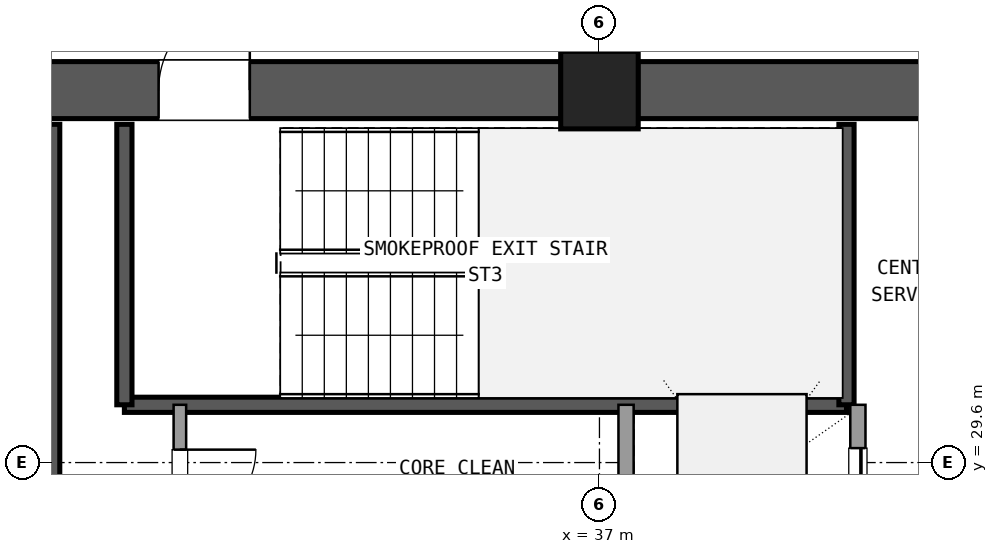
"""IFC4 building model, lengths in metres.
Left out: names, types, materials, properties, quantities, classifications, styles, units other than length and angle.
Written with IfcOpenShell. Run it as: python <this file> out.ifc"""

import sys

from ifc_helpers import new_model, si_unit, direction, frame, frame_2d, origin, origin_2d, place, context, subcontext, project, spatial, rectangle, extrude, element, fill, save


model = new_model("IFC4")
c1 = context("Model", 3, precision=1e-05, world=origin(), true_north=direction((0.0, 1.0)))
c2 = subcontext(c1, "Body", "Model", "MODEL_VIEW")
j1 = project(units=[si_unit("LENGTHUNIT", "METRE"), si_unit("PLANEANGLEUNIT", "RADIAN")], contexts=[c1])
p1 = place(None, origin())
s1 = spatial("IfcSite", under=j1, at=p1, CompositionType="ELEMENT")
p2 = place(p1, origin())
s2 = spatial("IfcBuilding", under=s1, at=p2, CompositionType="ELEMENT")
p3 = place(p2, frame((0.0, 0.0, 102.78)))
s3 = spatial("IfcBuildingStorey", under=s2, at=p3, CompositionType="ELEMENT", Elevation=102.78)
p4 = place(p3, frame((37.0, 34.5, 0.0), z_axis=(0.0, 0.0, 1.0), x_axis=(1.0, 0.0, 0.0)))
e1 = element("IfcColumn", 1, at=p4, inside=s3, PredefinedType="COLUMN", context=c2, shape_type="SweptSolid", body=[
    extrude(rectangle(XDim=1.02, YDim=1.02, at=origin_2d()), origin(), (0.0, 0.0, 1.0), 3.6),
])
p5 = place(p3, frame((47.695, 34.5, 0.0), z_axis=(0.0, 0.0, 1.0), x_axis=(-1.0, 0.0, 0.0)))
e2 = element("IfcWall", 2, at=p5, inside=s3, PredefinedType="SHEAR", context=c2, shape_type="SweptSolid", body=[
    extrude(rectangle(XDim=10.19, YDim=0.75, at=frame_2d((5.095, 0.0))), origin(), (0.0, 0.0, 1.0), 3.32),
])
p6 = place(p5, frame((4.595, 0.0, 0.0)))
e3 = element("IfcOpeningElement", 3, at=p6, cuts=e2, PredefinedType="OPENING", context=c2, shape_type="SweptSolid", body=[
    extrude(rectangle(XDim=1.6, YDim=2.2, at=frame_2d((0.8, 1.1))), frame((0.0, 0.385, 0.0), z_axis=(0.0, -1.0, 0.0), x_axis=(1.0, 0.0, 0.0)), (0.0, 0.0, 1.0), 0.77),
])
p7 = place(p3, frame((36.495, 34.5, 0.0), z_axis=(0.0, 0.0, 1.0), x_axis=(-1.0, 0.0, 0.0)))
e4 = element("IfcWall", 4, at=p7, inside=s3, PredefinedType="SHEAR", context=c2, shape_type="SweptSolid", body=[
    extrude(rectangle(XDim=10.19, YDim=0.75, at=frame_2d((5.095, 0.0))), origin(), (0.0, 0.0, 1.0), 3.32),
])
p8 = place(p7, frame((4.095, 0.0, 0.0)))
e5 = element("IfcOpeningElement", 5, at=p8, cuts=e4, PredefinedType="OPENING", context=c2, shape_type="SweptSolid", body=[
    extrude(rectangle(XDim=1.2, YDim=2.15, at=frame_2d((0.6, 1.075))), frame((0.0, 0.385, 0.0), z_axis=(0.0, -1.0, 0.0), x_axis=(1.0, 0.0, 0.0)), (0.0, 0.0, 1.0), 0.77),
])
p9 = place(p3, frame((29.8, 24.65, 0.0), z_axis=(0.0, 0.0, 1.0), x_axis=(0.0, 1.0, 0.0)))
e6 = element("IfcWall", 6, at=p9, inside=s3, PredefinedType="SHEAR", context=c2, shape_type="SweptSolid", body=[
    extrude(rectangle(XDim=9.4, YDim=0.2, at=frame_2d((4.7, 0.0))), origin(), (0.0, 0.0, 1.0), 3.32),
])
p10 = place(p3, frame((30.75, 30.36, 0.0), z_axis=(0.0, 0.0, 1.0), x_axis=(1.0, 0.0, 0.0)))
e7 = element("IfcWall", 7, at=p10, inside=s3, PredefinedType="SHEAR", context=c2, shape_type="SweptSolid", body=[
    extrude(rectangle(XDim=9.5, YDim=0.2, at=frame_2d((4.75, 0.0))), origin(), (0.0, 0.0, 1.0), 3.32),
])
for number, where, z_axis, x_axis in (
    (8, (30.75, 30.36, 0.0), (0.0, 0.0, 1.0), (0.0, 1.0, 0.0)),
    (9, (40.25, 30.36, 0.0), (0.0, 0.0, 1.0), (0.0, 1.0, 0.0)),
):
    element("IfcWall", number, at=place(p3, frame(where, z_axis=z_axis, x_axis=x_axis)), inside=s3, PredefinedType="SHEAR", context=c2, shape_type="SweptSolid", body=[
        extrude(rectangle(XDim=3.69, YDim=0.2, at=frame_2d((1.845, 0.0))), origin(), (0.0, 0.0, 1.0), 3.32),
    ])
p11 = place(p3, frame((37.35, 23.54, 0.0), z_axis=(0.0, 0.0, 1.0), x_axis=(0.0, 1.0, 0.0)))
e10 = element("IfcWall", 10, at=p11, inside=s3, PredefinedType="SOLIDWALL", context=c2, shape_type="SweptSolid", body=[
    extrude(rectangle(XDim=6.82, YDim=0.2, at=frame_2d((3.41, 0.0))), origin(), (0.0, 0.0, 1.0), 2.61),
])
p12 = place(p3, frame((40.4, 23.54, 0.0), z_axis=(0.0, 0.0, 1.0), x_axis=(0.0, 1.0, 0.0)))
e11 = element("IfcWall", 11, at=p12, inside=s3, PredefinedType="SOLIDWALL", context=c2, shape_type="SweptSolid", body=[
    extrude(rectangle(XDim=6.82, YDim=0.2, at=frame_2d((3.41, 0.0))), origin(), (0.0, 0.0, 1.0), 2.61),
])
p13 = place(p12, frame((0.35, 0.0, 0.0)))
e12 = element("IfcOpeningElement", 12, at=p13, cuts=e11, PredefinedType="OPENING", context=c2, shape_type="SweptSolid", body=[
    extrude(rectangle(XDim=1.4, YDim=2.2, at=frame_2d((0.7, 1.1))), frame((0.0, 0.11, 0.0), z_axis=(0.0, -1.0, 0.0), x_axis=(1.0, 0.0, 0.0)), (0.0, 0.0, 1.0), 0.22),
])
p14 = place(p12, frame((2.65, 0.0, 0.0)))
e13 = element("IfcOpeningElement", 13, at=p14, cuts=e11, PredefinedType="OPENING", context=c2, shape_type="SweptSolid", body=[
    extrude(rectangle(XDim=1.4, YDim=2.2, at=frame_2d((0.7, 1.1))), frame((0.0, 0.11, 0.0), z_axis=(0.0, -1.0, 0.0), x_axis=(1.0, 0.0, 0.0)), (0.0, 0.0, 1.0), 0.22),
])
p15 = place(p12, frame((4.85, 0.0, 0.0)))
e14 = element("IfcOpeningElement", 14, at=p15, cuts=e11, PredefinedType="OPENING", context=c2, shape_type="SweptSolid", body=[
    extrude(rectangle(XDim=1.4, YDim=2.2, at=frame_2d((0.7, 1.1))), frame((0.0, 0.11, 0.0), z_axis=(0.0, -1.0, 0.0), x_axis=(1.0, 0.0, 0.0)), (0.0, 0.0, 1.0), 0.22),
])
p16 = place(p3, frame((31.48, 26.32, 0.0), z_axis=(0.0, 0.0, 1.0), x_axis=(0.0, 1.0, 0.0)))
e15 = element("IfcWall", 15, at=p16, inside=s3, PredefinedType="PLUMBINGWALL", context=c2, shape_type="SweptSolid", body=[
    extrude(rectangle(XDim=4.04, YDim=0.165, at=frame_2d((2.02, 0.0))), origin(), (0.0, 0.0, 1.0), 2.61),
])
p17 = place(p16, frame((0.5, 0.0, 0.0)))
e16 = element("IfcOpeningElement", 16, at=p17, cuts=e15, PredefinedType="OPENING", context=c2, shape_type="SweptSolid", body=[
    extrude(rectangle(XDim=0.95, YDim=2.1, at=frame_2d((0.475, 1.05))), frame((0.0, 0.093, 0.0), z_axis=(0.0, -1.0, 0.0), x_axis=(1.0, 0.0, 0.0)), (0.0, 0.0, 1.0), 0.185),
])
p18 = place(p16, frame((2.45, 0.0, 0.0)))
e17 = element("IfcOpeningElement", 17, at=p18, cuts=e15, PredefinedType="OPENING", context=c2, shape_type="SweptSolid", body=[
    extrude(rectangle(XDim=1.0, YDim=2.15, at=frame_2d((0.5, 1.075))), frame((0.0, 0.093, 0.0), z_axis=(0.0, -1.0, 0.0), x_axis=(1.0, 0.0, 0.0)), (0.0, 0.0, 1.0), 0.185),
])
p19 = place(p3, frame((37.0, 34.95, 0.0), z_axis=(0.0, 0.0, 1.0), x_axis=(0.0, 1.0, 0.0)))
e18 = element("IfcWall", 18, at=p19, inside=s3, PredefinedType="PARTITIONING", context=c2, shape_type="SweptSolid", body=[
    extrude(rectangle(XDim=3.21, YDim=0.18, at=frame_2d((1.605, 0.0))), origin(), (0.0, 0.0, 1.0), 2.61),
])
p20 = place(p19, frame((0.605, 0.0, 0.0)))
e19 = element("IfcOpeningElement", 19, at=p20, cuts=e18, PredefinedType="OPENING", context=c2, shape_type="SweptSolid", body=[
    extrude(rectangle(XDim=2.0, YDim=2.2, at=frame_2d((1.0, 1.1))), frame((0.0, 0.1, 0.0), z_axis=(0.0, -1.0, 0.0), x_axis=(1.0, 0.0, 0.0)), (0.0, 0.0, 1.0), 0.2),
])
p21 = place(p8, frame((1.2, 0.0, 0.0), z_axis=(0.0, 0.0, 1.0), x_axis=(-1.0, 0.0, 0.0)))
e20 = element("IfcDoor", 20, at=p21, inside=s3, OperationType="SINGLE_SWING_LEFT", PredefinedType="DOOR", context=c2, shape_type="SweptSolid", body=[
    extrude(rectangle(XDim=1.2, YDim=2.15, at=frame_2d((0.6, 1.075))), frame((0.0, 0.025, 0.0), z_axis=(0.0, -1.0, 0.0), x_axis=(1.0, 0.0, 0.0)), (0.0, 0.0, 1.0), 0.05),
])
fill(e5, e20)
p22 = place(p15, origin())
e21 = element("IfcDoor", 21, at=p22, inside=s3, OperationType="SLIDING_TO_RIGHT", PredefinedType="DOOR", context=c2, shape_type="SweptSolid", body=[
    extrude(rectangle(XDim=1.4, YDim=2.2, at=frame_2d((0.7, 1.1))), frame((0.0, 0.025, 0.0), z_axis=(0.0, -1.0, 0.0), x_axis=(1.0, 0.0, 0.0)), (0.0, 0.0, 1.0), 0.05),
])
fill(e14, e21)
p23 = place(p18, frame((1.0, 0.0, 0.0), z_axis=(0.0, 0.0, 1.0), x_axis=(-1.0, 0.0, 0.0)))
e22 = element("IfcDoor", 22, at=p23, inside=s3, OperationType="SINGLE_SWING_RIGHT", PredefinedType="DOOR", context=c2, shape_type="SweptSolid", body=[
    extrude(rectangle(XDim=1.0, YDim=2.15, at=frame_2d((0.5, 1.075))), frame((0.0, 0.025, 0.0), z_axis=(0.0, -1.0, 0.0), x_axis=(1.0, 0.0, 0.0)), (0.0, 0.0, 1.0), 0.05),
])
fill(e17, e22)
save(model, sys.argv[1])
